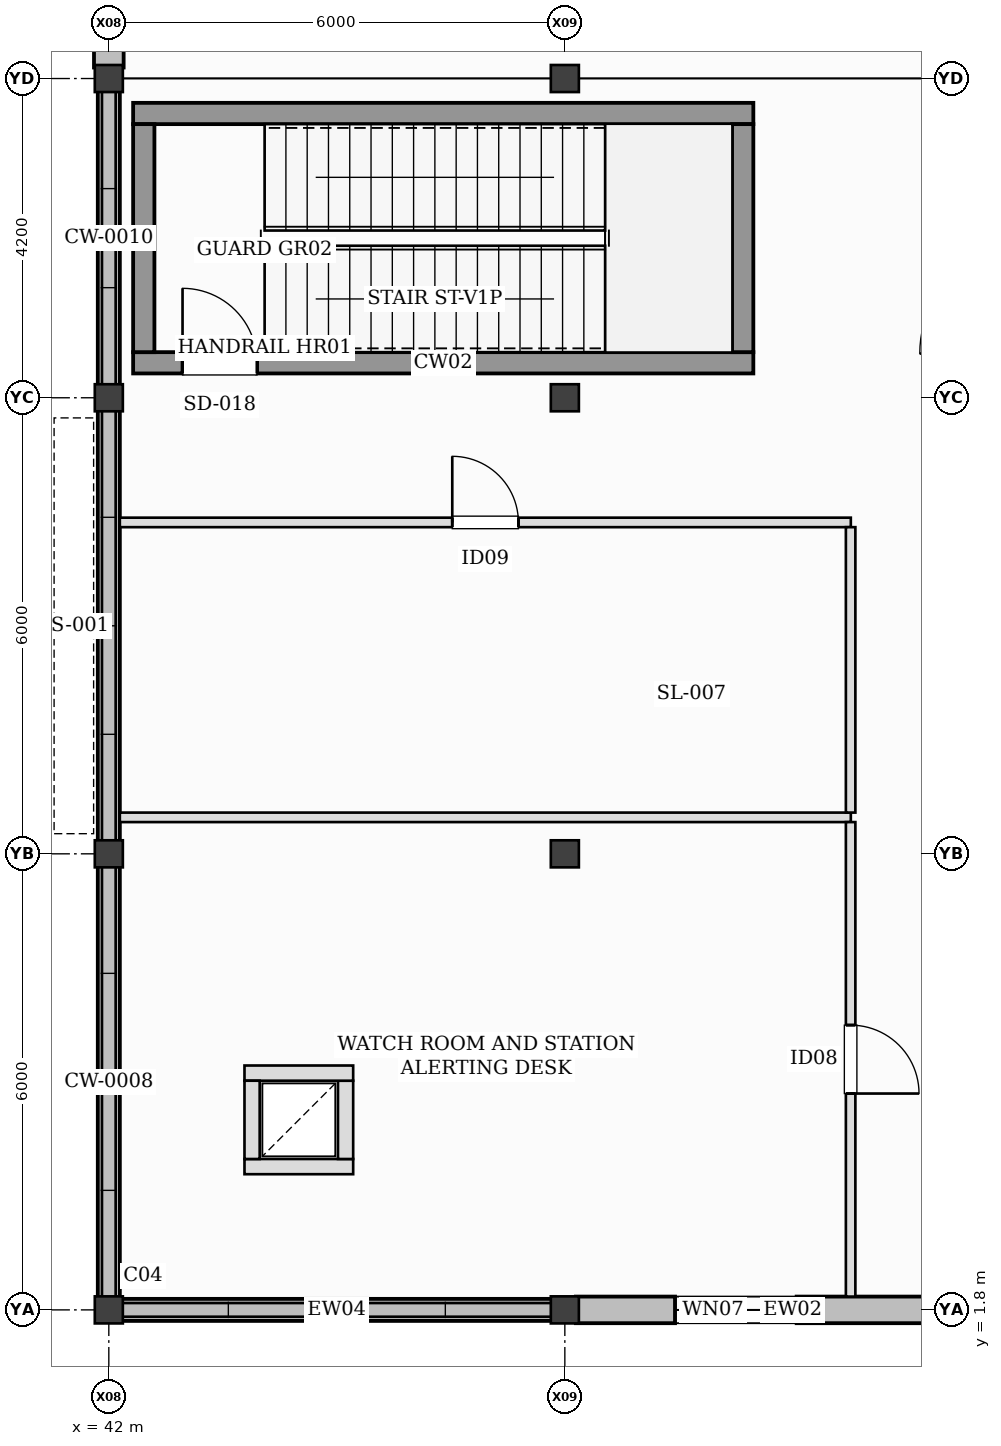
"""IFC4 building model, lengths in metres.
Left out: names, types, materials, properties, quantities, classifications, styles, units other than length and angle.
Written with IfcOpenShell. Run it as: python <this file> out.ifc"""

import sys

from ifc_helpers import new_model, si_unit, direction, frame, frame_2d, origin, origin_2d, place, context, subcontext, project, spatial, rectangle, i_section, extrude, element, fill, save


model = new_model("IFC4")
c1 = context("Model", 3, precision=1e-05, world=origin(), true_north=direction((0.0, 1.0)))
c2 = subcontext(c1, "Body", "Model", "MODEL_VIEW")
j1 = project(units=[si_unit("LENGTHUNIT", "METRE"), si_unit("PLANEANGLEUNIT", "RADIAN")], contexts=[c1])
p1 = place(None, origin())
s1 = spatial("IfcSite", under=j1, at=p1, CompositionType="ELEMENT")
p2 = place(p1, origin())
s2 = spatial("IfcBuilding", under=s1, at=p2, CompositionType="ELEMENT")
p3 = place(p2, origin())
s3 = spatial("IfcBuildingStorey", under=s2, at=p3, CompositionType="ELEMENT", Elevation=0.0)
for number, where, z_axis, x_axis in (
    (1, (42.0, 1.8, -0.41), (0.0, 0.0, 1.0), (1.0, 0.0, 0.0)),
    (2, (42.0, 7.8, -0.41), (0.0, 0.0, 1.0), (1.0, 0.0, 0.0)),
    (3, (42.0, 13.8, -0.41), (0.0, 0.0, 1.0), (1.0, 0.0, 0.0)),
    (4, (42.0, 18.0, -0.41), (0.0, 0.0, 1.0), (1.0, 0.0, 0.0)),
    (5, (48.0, 1.8, -0.41), (0.0, 0.0, 1.0), (1.0, 0.0, 0.0)),
    (6, (48.0, 7.8, -0.41), (0.0, 0.0, 1.0), (1.0, 0.0, 0.0)),
    (7, (48.0, 13.8, -0.41), (0.0, 0.0, 1.0), (1.0, 0.0, 0.0)),
    (8, (48.0, 18.0, -0.41), (0.0, 0.0, 1.0), (1.0, 0.0, 0.0)),
):
    element("IfcColumn", number, at=place(p3, frame(where, z_axis=z_axis, x_axis=x_axis)), inside=s3, PredefinedType="COLUMN", context=c2, shape_type="SweptSolid", body=[
        extrude(i_section(OverallWidth=0.369, OverallDepth=0.356, WebThickness=0.011, FlangeThickness=0.018, at=origin_2d()), origin(), (0.0, 0.0, 1.0), 6.41),
    ])
p4 = place(p3, frame((42.145, 1.8, 0.0), z_axis=(0.0, 0.0, 1.0), x_axis=(1.0, 0.0, 0.0)))
e9 = element("IfcWall", 9, at=p4, inside=s3, PredefinedType="STANDARD", context=c2, shape_type="SweptSolid", body=[
    extrude(rectangle(XDim=5.71, YDim=0.29, at=frame_2d((2.855, 0.0))), origin(), (0.0, 0.0, 1.0), 0.44),
])
p5 = place(p3, frame((48.145, 1.8, 0.0), z_axis=(0.0, 0.0, 1.0), x_axis=(1.0, 0.0, 0.0)))
e10 = element("IfcWall", 10, at=p5, inside=s3, PredefinedType="STANDARD", context=c2, shape_type="SweptSolid", body=[
    extrude(rectangle(XDim=5.71, YDim=0.35, at=frame_2d((2.855, 0.0))), origin(), (0.0, 0.0, 1.0), 5.035),
])
p6 = place(p5, frame((1.305, 0.0, 1.0)))
e11 = element("IfcOpeningElement", 11, at=p6, cuts=e10, PredefinedType="OPENING", context=c2, shape_type="SweptSolid", body=[
    extrude(rectangle(XDim=1.6, YDim=1.36, at=frame_2d((0.8, 0.68))), frame((0.0, 0.185, 0.0), z_axis=(0.0, -1.0, 0.0), x_axis=(1.0, 0.0, 0.0)), (0.0, 0.0, 1.0), 0.37),
])
p7 = place(p3, frame((42.0, 7.655, 0.0), z_axis=(0.0, 0.0, 1.0), x_axis=(0.0, -1.0, 0.0)))
e12 = element("IfcWall", 12, at=p7, inside=s3, PredefinedType="STANDARD", context=c2, shape_type="SweptSolid", body=[
    extrude(rectangle(XDim=5.71, YDim=0.29, at=frame_2d((2.855, 0.0))), origin(), (0.0, 0.0, 1.0), 0.56),
])
p8 = place(p3, frame((42.0, 13.655, 0.0), z_axis=(0.0, 0.0, 1.0), x_axis=(0.0, -1.0, 0.0)))
e13 = element("IfcWall", 13, at=p8, inside=s3, PredefinedType="STANDARD", context=c2, shape_type="SweptSolid", body=[
    extrude(rectangle(XDim=5.71, YDim=0.29, at=frame_2d((2.855, 0.0))), origin(), (0.0, 0.0, 1.0), 0.68),
])
p9 = place(p3, frame((42.0, 17.855, 0.0), z_axis=(0.0, 0.0, 1.0), x_axis=(0.0, -1.0, 0.0)))
e14 = element("IfcWall", 14, at=p9, inside=s3, PredefinedType="STANDARD", context=c2, shape_type="SweptSolid", body=[
    extrude(rectangle(XDim=3.91, YDim=0.29, at=frame_2d((1.955, 0.0))), origin(), (0.0, 0.0, 1.0), 0.8),
])
p10 = place(p3, frame((42.0, 23.855, 0.0), z_axis=(0.0, 0.0, 1.0), x_axis=(0.0, -1.0, 0.0)))
e15 = element("IfcWall", 15, at=p10, inside=s3, PredefinedType="STANDARD", context=c2, shape_type="SweptSolid", body=[
    extrude(rectangle(XDim=5.71, YDim=0.39, at=frame_2d((2.855, 0.0))), origin(), (0.0, 0.0, 1.0), 6.0),
])
p11 = place(p10, frame((1.855, 0.0, 1.0)))
e16 = element("IfcOpeningElement", 16, at=p11, cuts=e15, PredefinedType="OPENING", context=c2, shape_type="SweptSolid", body=[
    extrude(rectangle(XDim=2.0, YDim=1.36, at=frame_2d((1.0, 0.68))), frame((0.0, 0.205, 0.0), z_axis=(0.0, -1.0, 0.0), x_axis=(1.0, 0.0, 0.0)), (0.0, 0.0, 1.0), 0.41),
])
p12 = place(p3, frame((42.32, 14.26, 0.0), z_axis=(0.0, 0.0, 1.0), x_axis=(1.0, 0.0, 0.0)))
e17 = element("IfcWall", 17, at=p12, inside=s3, PredefinedType="SHEAR", context=c2, shape_type="SweptSolid", body=[
    extrude(rectangle(XDim=8.16, YDim=0.28, at=frame_2d((4.08, 0.0))), origin(), (0.0, 0.0, 1.0), 6.0),
])
p13 = place(p12, frame((0.65, 0.0, 0.0)))
e18 = element("IfcOpeningElement", 18, at=p13, cuts=e17, PredefinedType="OPENING", context=c2, shape_type="SweptSolid", body=[
    extrude(rectangle(XDim=0.98, YDim=2.15, at=frame_2d((0.49, 1.075))), frame((0.0, 0.15, 0.0), z_axis=(0.0, -1.0, 0.0), x_axis=(1.0, 0.0, 0.0)), (0.0, 0.0, 1.0), 0.3),
])
p14 = place(p3, frame((50.48, 17.54, 0.0), z_axis=(0.0, 0.0, 1.0), x_axis=(-1.0, 0.0, 0.0)))
e19 = element("IfcWall", 19, at=p14, inside=s3, PredefinedType="SHEAR", context=c2, shape_type="SweptSolid", body=[
    extrude(rectangle(XDim=8.16, YDim=0.28, at=frame_2d((4.08, 0.0))), origin(), (0.0, 0.0, 1.0), 6.0),
])
for number, where, z_axis, x_axis in (
    (20, (42.46, 17.4, 0.0), (0.0, 0.0, 1.0), (0.0, -1.0, 0.0)),
    (21, (50.34, 14.4, 0.0), (0.0, 0.0, 1.0), (0.0, 1.0, 0.0)),
):
    element("IfcWall", number, at=place(p3, frame(where, z_axis=z_axis, x_axis=x_axis)), inside=s3, PredefinedType="SHEAR", context=c2, shape_type="SweptSolid", body=[
        extrude(rectangle(XDim=3.0, YDim=0.28, at=frame_2d((1.5, 0.0))), origin(), (0.0, 0.0, 1.0), 6.0),
    ])
p15 = place(p3, frame((43.785, 3.685, 0.0), z_axis=(0.0, 0.0, 1.0), x_axis=(1.0, 0.0, 0.0)))
e22 = element("IfcWall", 22, at=p15, inside=s3, PredefinedType="PARTITIONING", context=c2, shape_type="SweptSolid", body=[
    extrude(rectangle(XDim=1.43, YDim=0.2, at=frame_2d((0.715, 0.0))), origin(), (0.0, 0.0, 1.0), 5.68),
])
p16 = place(p3, frame((45.115, 3.785, 0.0), z_axis=(0.0, 0.0, 1.0), x_axis=(0.0, 1.0, 0.0)))
e23 = element("IfcWall", 23, at=p16, inside=s3, PredefinedType="PARTITIONING", context=c2, shape_type="SweptSolid", body=[
    extrude(rectangle(XDim=1.03, YDim=0.2, at=frame_2d((0.515, 0.0))), origin(), (0.0, 0.0, 1.0), 5.68),
])
p17 = place(p3, frame((45.215, 4.915, 0.0), z_axis=(0.0, 0.0, 1.0), x_axis=(-1.0, 0.0, 0.0)))
e24 = element("IfcWall", 24, at=p17, inside=s3, PredefinedType="PARTITIONING", context=c2, shape_type="SweptSolid", body=[
    extrude(rectangle(XDim=1.43, YDim=0.2, at=frame_2d((0.715, 0.0))), origin(), (0.0, 0.0, 1.0), 5.68),
])
p18 = place(p3, frame((43.885, 4.815, 0.0), z_axis=(0.0, 0.0, 1.0), x_axis=(0.0, -1.0, 0.0)))
e25 = element("IfcWall", 25, at=p18, inside=s3, PredefinedType="PARTITIONING", context=c2, shape_type="SweptSolid", body=[
    extrude(rectangle(XDim=1.03, YDim=0.2, at=frame_2d((0.515, 0.0))), origin(), (0.0, 0.0, 1.0), 5.39),
])
p19 = place(p3, frame((42.145, 8.28, 0.0), z_axis=(0.0, 0.0, 1.0), x_axis=(1.0, 0.0, 0.0)))
e26 = element("IfcWall", 26, at=p19, inside=s3, PredefinedType="PARTITIONING", context=c2, shape_type="SweptSolid", body=[
    extrude(rectangle(XDim=9.617, YDim=0.125, at=frame_2d((4.809, 0.0))), origin(), (0.0, 0.0, 1.0), 5.68),
])
p20 = place(p3, frame((51.76, 8.218, 0.0), z_axis=(0.0, 0.0, 1.0), x_axis=(0.0, -1.0, 0.0)))
e27 = element("IfcWall", 27, at=p20, inside=s3, PredefinedType="PARTITIONING", context=c2, shape_type="SweptSolid", body=[
    extrude(rectangle(XDim=6.242, YDim=0.125, at=frame_2d((3.121, 0.0))), origin(), (0.0, 0.0, 1.0), 5.294),
])
p21 = place(p20, frame((2.671, 0.0, 0.0)))
e28 = element("IfcOpeningElement", 28, at=p21, cuts=e27, PredefinedType="OPENING", context=c2, shape_type="SweptSolid", body=[
    extrude(rectangle(XDim=0.9, YDim=2.1, at=frame_2d((0.45, 1.05))), frame((0.0, 0.073, 0.0), z_axis=(0.0, -1.0, 0.0), x_axis=(1.0, 0.0, 0.0)), (0.0, 0.0, 1.0), 0.145),
])
p22 = place(p3, frame((42.145, 12.16, 0.0), z_axis=(0.0, 0.0, 1.0), x_axis=(1.0, 0.0, 0.0)))
e29 = element("IfcWall", 29, at=p22, inside=s3, PredefinedType="PARTITIONING", context=c2, shape_type="SweptSolid", body=[
    extrude(rectangle(XDim=9.617, YDim=0.125, at=frame_2d((4.809, 0.0))), origin(), (0.0, 0.0, 1.0), 5.68),
])
p23 = place(p22, frame((4.374, 0.0, 0.0)))
e30 = element("IfcOpeningElement", 30, at=p23, cuts=e29, PredefinedType="OPENING", context=c2, shape_type="SweptSolid", body=[
    extrude(rectangle(XDim=0.87, YDim=2.06, at=frame_2d((0.435, 1.03))), frame((0.0, 0.073, 0.0), z_axis=(0.0, -1.0, 0.0), x_axis=(1.0, 0.0, 0.0)), (0.0, 0.0, 1.0), 0.145),
])
p24 = place(p3, frame((51.76, 12.097, 0.0), z_axis=(0.0, 0.0, 1.0), x_axis=(0.0, -1.0, 0.0)))
e31 = element("IfcWall", 31, at=p24, inside=s3, PredefinedType="PARTITIONING", context=c2, shape_type="SweptSolid", body=[
    extrude(rectangle(XDim=3.755, YDim=0.125, at=frame_2d((1.877, 0.0))), origin(), (0.0, 0.0, 1.0), 5.339),
])
p25 = place(p6, origin())
e32 = element("IfcWindow", 32, at=p25, inside=s3, PartitioningType="SINGLE_PANEL", PredefinedType="WINDOW", context=c2, shape_type="SweptSolid", body=[
    extrude(rectangle(XDim=1.6, YDim=1.36, at=frame_2d((0.8, 0.68))), frame((0.0, 0.03, 0.0), z_axis=(0.0, -1.0, 0.0), x_axis=(1.0, 0.0, 0.0)), (0.0, 0.0, 1.0), 0.06),
])
fill(e11, e32)
p26 = place(p13, origin())
e33 = element("IfcDoor", 33, at=p26, inside=s3, OperationType="SINGLE_SWING_LEFT", PredefinedType="DOOR", context=c2, shape_type="SweptSolid", body=[
    extrude(rectangle(XDim=0.98, YDim=2.15, at=frame_2d((0.49, 1.075))), frame((0.0, 0.025, 0.0), z_axis=(0.0, -1.0, 0.0), x_axis=(1.0, 0.0, 0.0)), (0.0, 0.0, 1.0), 0.05),
])
fill(e18, e33)
p27 = place(p21, frame((0.9, 0.0, 0.0), z_axis=(0.0, 0.0, 1.0), x_axis=(-1.0, 0.0, 0.0)))
e34 = element("IfcDoor", 34, at=p27, inside=s3, OperationType="SINGLE_SWING_RIGHT", PredefinedType="DOOR", context=c2, shape_type="SweptSolid", body=[
    extrude(rectangle(XDim=0.9, YDim=2.1, at=frame_2d((0.45, 1.05))), frame((0.0, 0.025, 0.0), z_axis=(0.0, -1.0, 0.0), x_axis=(1.0, 0.0, 0.0)), (0.0, 0.0, 1.0), 0.05),
])
fill(e28, e34)
p28 = place(p23, frame((0.87, 0.0, 0.0), z_axis=(0.0, 0.0, 1.0), x_axis=(-1.0, 0.0, 0.0)))
e35 = element("IfcDoor", 35, at=p28, inside=s3, OperationType="SINGLE_SWING_LEFT", PredefinedType="DOOR", context=c2, shape_type="SweptSolid", body=[
    extrude(rectangle(XDim=0.87, YDim=2.06, at=frame_2d((0.435, 1.03))), frame((0.0, 0.025, 0.0), z_axis=(0.0, -1.0, 0.0), x_axis=(1.0, 0.0, 0.0)), (0.0, 0.0, 1.0), 0.05),
])
fill(e30, e35)
save(model, sys.argv[1])
